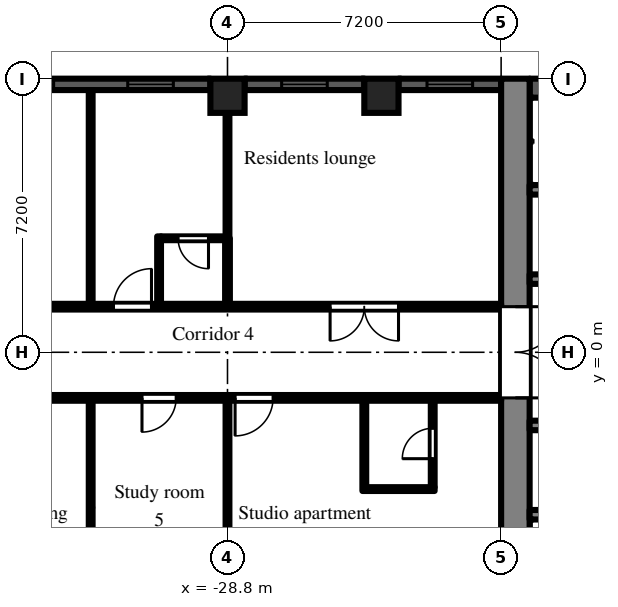
"""IFC4 building model, lengths in metres.
Left out: names, types, materials, properties, quantities, classifications, styles, units other than length and angle.
Written with IfcOpenShell. Run it as: python <this file> out.ifc"""

import sys

from ifc_helpers import new_model, si_unit, direction, frame, frame_2d, origin, origin_2d, place, context, subcontext, project, spatial, rectangle, extrude, element, fill, save


model = new_model("IFC4")
c1 = context("Model", 3, precision=1e-05, world=origin(), true_north=direction((0.0, 1.0)))
c2 = subcontext(c1, "Body", "Model", "MODEL_VIEW")
j1 = project(units=[si_unit("LENGTHUNIT", "METRE"), si_unit("PLANEANGLEUNIT", "RADIAN")], contexts=[c1])
p1 = place(None, origin())
s1 = spatial("IfcSite", under=j1, at=p1, CompositionType="ELEMENT")
p2 = place(p1, origin())
s2 = spatial("IfcBuilding", under=s1, at=p2, CompositionType="ELEMENT")
p3 = place(p2, frame((0.0, 0.0, 93.9)))
s3 = spatial("IfcBuildingStorey", under=s2, at=p3, CompositionType="ELEMENT", Elevation=93.9)
for number, where, z_axis, x_axis in (
    (1, (-28.8, 6.75, 0.0), (0.0, 0.0, 1.0), (1.0, 0.0, 0.0)),
    (2, (-24.75, 6.75, 0.0), (0.0, 0.0, 1.0), (1.0, 0.0, 0.0)),
):
    element("IfcColumn", number, at=place(p3, frame(where, z_axis=z_axis, x_axis=x_axis)), inside=s3, PredefinedType="COLUMN", context=c2, shape_type="SweptSolid", body=[
        extrude(rectangle(XDim=0.9, YDim=0.9, at=origin_2d()), origin(), (0.0, 0.0, 1.0), 3.0),
    ])
p4 = place(p3, frame((-21.6, 7.05, 0.0), z_axis=(0.0, 0.0, 1.0), x_axis=(-1.0, 0.0, 0.0)))
e3 = element("IfcWall", 3, at=p4, inside=s3, PredefinedType="SOLIDWALL", context=c2, shape_type="SweptSolid", body=[
    extrude(rectangle(XDim=2.7, YDim=0.3, at=frame_2d((1.35, 0.0))), origin(), (0.0, 0.0, 1.0), 2.1),
])
p5 = place(p4, frame((0.75, 0.0, 0.2)))
e4 = element("IfcOpeningElement", 4, at=p5, cuts=e3, PredefinedType="OPENING", context=c2, shape_type="SweptSolid", body=[
    extrude(rectangle(XDim=1.2, YDim=1.85, at=frame_2d((0.6, 0.925))), frame((0.0, 0.16, 0.0), z_axis=(0.0, -1.0, 0.0), x_axis=(1.0, 0.0, 0.0)), (0.0, 0.0, 1.0), 0.32),
])
p6 = place(p3, frame((-25.2, 7.05, 0.0), z_axis=(0.0, 0.0, 1.0), x_axis=(-1.0, 0.0, 0.0)))
e5 = element("IfcWall", 5, at=p6, inside=s3, PredefinedType="SOLIDWALL", context=c2, shape_type="SweptSolid", body=[
    extrude(rectangle(XDim=3.15, YDim=0.3, at=frame_2d((1.575, 0.0))), origin(), (0.0, 0.0, 1.0), 2.1),
])
p7 = place(p6, frame((0.975, 0.0, 0.2)))
e6 = element("IfcOpeningElement", 6, at=p7, cuts=e5, PredefinedType="OPENING", context=c2, shape_type="SweptSolid", body=[
    extrude(rectangle(XDim=1.2, YDim=1.85, at=frame_2d((0.6, 0.925))), frame((0.0, 0.16, 0.0), z_axis=(0.0, -1.0, 0.0), x_axis=(1.0, 0.0, 0.0)), (0.0, 0.0, 1.0), 0.32),
])
p8 = place(p3, frame((-29.25, 7.05, 0.0), z_axis=(0.0, 0.0, 1.0), x_axis=(-1.0, 0.0, 0.0)))
e7 = element("IfcWall", 7, at=p8, inside=s3, PredefinedType="SOLIDWALL", context=c2, shape_type="SweptSolid", body=[
    extrude(rectangle(XDim=6.3, YDim=0.3, at=frame_2d((3.15, 0.0))), origin(), (0.0, 0.0, 1.0), 2.1),
])
p9 = place(p8, frame((0.975, 0.0, 0.2)))
e8 = element("IfcOpeningElement", 8, at=p9, cuts=e7, PredefinedType="OPENING", context=c2, shape_type="SweptSolid", body=[
    extrude(rectangle(XDim=1.2, YDim=1.85, at=frame_2d((0.6, 0.925))), frame((0.0, 0.16, 0.0), z_axis=(0.0, -1.0, 0.0), x_axis=(1.0, 0.0, 0.0)), (0.0, 0.0, 1.0), 0.32),
])
p10 = place(p8, frame((4.125, 0.0, 0.2)))
e9 = element("IfcOpeningElement", 9, at=p10, cuts=e7, PredefinedType="OPENING", context=c2, shape_type="SweptSolid", body=[
    extrude(rectangle(XDim=1.2, YDim=1.85, at=frame_2d((0.6, 0.925))), frame((0.0, 0.16, 0.0), z_axis=(0.0, -1.0, 0.0), x_axis=(1.0, 0.0, 0.0)), (0.0, 0.0, 1.0), 0.32),
])
p11 = place(p3, frame((-21.225, -7.2, 0.0), z_axis=(0.0, 0.0, 1.0), x_axis=(0.0, 1.0, 0.0)))
e10 = element("IfcWall", 10, at=p11, inside=s3, PredefinedType="SHEAR", context=c2, shape_type="SweptSolid", body=[
    extrude(rectangle(XDim=14.4, YDim=0.75, at=frame_2d((7.2, 0.0))), origin(), (0.0, 0.0, 1.0), 2.575),
])
p12 = place(p11, frame((6.0, 0.0, 0.0)))
e11 = element("IfcOpeningElement", 11, at=p12, cuts=e10, PredefinedType="OPENING", context=c2, shape_type="SweptSolid", body=[
    extrude(rectangle(XDim=2.4, YDim=2.2, at=frame_2d((1.2, 1.1))), frame((0.0, 0.385, 0.0), z_axis=(0.0, -1.0, 0.0), x_axis=(1.0, 0.0, 0.0)), (0.0, 0.0, 1.0), 0.77),
])
p13 = place(p3, frame((-7.9, 6.95, 0.0), z_axis=(0.0, 0.0, 1.0), x_axis=(-1.0, 0.0, 0.0)))
e12 = element("IfcWall", 12, at=p13, inside=s3, PredefinedType="SHEAR", context=c2, shape_type="SweptSolid", body=[
    extrude(rectangle(XDim=12.95, YDim=0.5, at=frame_2d((6.475, 0.0))), origin(), (0.0, 0.0, 1.0), 2.575),
])
p14 = place(p3, frame((-7.9, 1.925, 0.0), z_axis=(0.0, 0.0, 1.0), x_axis=(-1.0, 0.0, 0.0)))
e13 = element("IfcWall", 13, at=p14, inside=s3, PredefinedType="SHEAR", context=c2, shape_type="SweptSolid", body=[
    extrude(rectangle(XDim=12.95, YDim=0.25, at=frame_2d((6.475, 0.0))), origin(), (0.0, 0.0, 1.0), 2.575),
])
p15 = place(p14, frame((0.525, 0.0, 0.0)))
e14 = element("IfcOpeningElement", 14, at=p15, cuts=e13, PredefinedType="OPENING", context=c2, shape_type="SweptSolid", body=[
    extrude(rectangle(XDim=0.9, YDim=2.1, at=frame_2d((0.45, 1.05))), frame((0.0, 0.135, 0.0), z_axis=(0.0, -1.0, 0.0), x_axis=(1.0, 0.0, 0.0)), (0.0, 0.0, 1.0), 0.27),
])
p16 = place(p14, frame((2.625, 0.0, 0.0)))
e15 = element("IfcOpeningElement", 15, at=p16, cuts=e13, PredefinedType="OPENING", context=c2, shape_type="SweptSolid", body=[
    extrude(rectangle(XDim=1.1, YDim=2.1, at=frame_2d((0.55, 1.05))), frame((0.0, 0.135, 0.0), z_axis=(0.0, -1.0, 0.0), x_axis=(1.0, 0.0, 0.0)), (0.0, 0.0, 1.0), 0.27),
])
p17 = place(p14, frame((7.125, 0.0, 0.0)))
e16 = element("IfcOpeningElement", 16, at=p17, cuts=e13, PredefinedType="OPENING", context=c2, shape_type="SweptSolid", body=[
    extrude(rectangle(XDim=0.9, YDim=2.1, at=frame_2d((0.45, 1.05))), frame((0.0, 0.135, 0.0), z_axis=(0.0, -1.0, 0.0), x_axis=(1.0, 0.0, 0.0)), (0.0, 0.0, 1.0), 0.27),
])
p18 = place(p3, frame((-12.3, 4.275, 0.0), z_axis=(0.0, 0.0, 1.0), x_axis=(-1.0, 0.0, 0.0)))
e17 = element("IfcWall", 17, at=p18, inside=s3, PredefinedType="SHEAR", context=c2, shape_type="SweptSolid", body=[
    extrude(rectangle(XDim=8.55, YDim=0.25, at=frame_2d((4.275, 0.0))), origin(), (0.0, 0.0, 1.0), 2.575),
])
p19 = place(p3, frame((-7.9, -1.925, 0.0), z_axis=(0.0, 0.0, 1.0), x_axis=(-1.0, 0.0, 0.0)))
e18 = element("IfcWall", 18, at=p19, inside=s3, PredefinedType="SHEAR", context=c2, shape_type="SweptSolid", body=[
    extrude(rectangle(XDim=12.95, YDim=0.25, at=frame_2d((6.475, 0.0))), origin(), (0.0, 0.0, 1.0), 2.575),
])
p20 = place(p19, frame((4.825, 0.0, 0.0)))
e19 = element("IfcOpeningElement", 19, at=p20, cuts=e18, PredefinedType="OPENING", context=c2, shape_type="SweptSolid", body=[
    extrude(rectangle(XDim=1.1, YDim=2.1, at=frame_2d((0.55, 1.05))), frame((0.0, 0.135, 0.0), z_axis=(0.0, -1.0, 0.0), x_axis=(1.0, 0.0, 0.0)), (0.0, 0.0, 1.0), 0.27),
])
p21 = place(p19, frame((7.025, 0.0, 0.0)))
e20 = element("IfcOpeningElement", 20, at=p21, cuts=e18, PredefinedType="OPENING", context=c2, shape_type="SweptSolid", body=[
    extrude(rectangle(XDim=1.1, YDim=2.1, at=frame_2d((0.55, 1.05))), frame((0.0, 0.135, 0.0), z_axis=(0.0, -1.0, 0.0), x_axis=(1.0, 0.0, 0.0)), (0.0, 0.0, 1.0), 0.27),
])
p22 = place(p19, frame((9.225, 0.0, 0.0)))
e21 = element("IfcOpeningElement", 21, at=p22, cuts=e18, PredefinedType="OPENING", context=c2, shape_type="SweptSolid", body=[
    extrude(rectangle(XDim=1.1, YDim=2.1, at=frame_2d((0.55, 1.05))), frame((0.0, 0.135, 0.0), z_axis=(0.0, -1.0, 0.0), x_axis=(1.0, 0.0, 0.0)), (0.0, 0.0, 1.0), 0.27),
])
p23 = place(p19, frame((0.525, 0.0, 0.0)))
e22 = element("IfcOpeningElement", 22, at=p23, cuts=e18, PredefinedType="OPENING", context=c2, shape_type="SweptSolid", body=[
    extrude(rectangle(XDim=0.9, YDim=2.1, at=frame_2d((0.45, 1.05))), frame((0.0, 0.135, 0.0), z_axis=(0.0, -1.0, 0.0), x_axis=(1.0, 0.0, 0.0)), (0.0, 0.0, 1.0), 0.27),
])
p24 = place(p19, frame((2.625, 0.0, 0.0)))
e23 = element("IfcOpeningElement", 23, at=p24, cuts=e18, PredefinedType="OPENING", context=c2, shape_type="SweptSolid", body=[
    extrude(rectangle(XDim=1.1, YDim=2.1, at=frame_2d((0.55, 1.05))), frame((0.0, 0.135, 0.0), z_axis=(0.0, -1.0, 0.0), x_axis=(1.0, 0.0, 0.0)), (0.0, 0.0, 1.0), 0.27),
])
p25 = place(p3, frame((-12.3, -4.275, 0.0), z_axis=(0.0, 0.0, 1.0), x_axis=(-1.0, 0.0, 0.0)))
e24 = element("IfcWall", 24, at=p25, inside=s3, PredefinedType="SHEAR", context=c2, shape_type="SweptSolid", body=[
    extrude(rectangle(XDim=8.55, YDim=0.25, at=frame_2d((4.275, 0.0))), origin(), (0.0, 0.0, 1.0), 2.575),
])
p26 = place(p3, frame((-36.5, -1.2, 0.0), z_axis=(0.0, 0.0, 1.0), x_axis=(1.0, 0.0, 0.0)))
e25 = element("IfcWall", 25, at=p26, inside=s3, PredefinedType="PARTITIONING", context=c2, shape_type="SweptSolid", body=[
    extrude(rectangle(XDim=14.9, YDim=0.15, at=frame_2d((7.45, 0.0))), origin(), (0.0, 0.0, 1.0), 2.575),
])
p27 = place(p26, frame((7.9, 0.0, 0.0)))
e26 = element("IfcOpeningElement", 26, at=p27, cuts=e25, PredefinedType="OPENING", context=c2, shape_type="SweptSolid", body=[
    extrude(rectangle(XDim=1.0, YDim=2.1, at=frame_2d((0.5, 1.05))), frame((0.0, 0.085, 0.0), z_axis=(0.0, -1.0, 0.0), x_axis=(1.0, 0.0, 0.0)), (0.0, 0.0, 1.0), 0.17),
])
p28 = place(p26, frame((5.45, 0.0, 0.0)))
e27 = element("IfcOpeningElement", 27, at=p28, cuts=e25, PredefinedType="OPENING", context=c2, shape_type="SweptSolid", body=[
    extrude(rectangle(XDim=0.9, YDim=2.1, at=frame_2d((0.45, 1.05))), frame((0.0, 0.085, 0.0), z_axis=(0.0, -1.0, 0.0), x_axis=(1.0, 0.0, 0.0)), (0.0, 0.0, 1.0), 0.17),
])
p29 = place(p26, frame((1.15, 0.0, 0.0)))
e28 = element("IfcOpeningElement", 28, at=p29, cuts=e25, PredefinedType="OPENING", context=c2, shape_type="SweptSolid", body=[
    extrude(rectangle(XDim=1.8, YDim=2.1, at=frame_2d((0.9, 1.05))), frame((0.0, 0.085, 0.0), z_axis=(0.0, -1.0, 0.0), x_axis=(1.0, 0.0, 0.0)), (0.0, 0.0, 1.0), 0.17),
])
p30 = place(p3, frame((-36.5, 1.2, 0.0), z_axis=(0.0, 0.0, 1.0), x_axis=(1.0, 0.0, 0.0)))
e29 = element("IfcWall", 29, at=p30, inside=s3, PredefinedType="PARTITIONING", context=c2, shape_type="SweptSolid", body=[
    extrude(rectangle(XDim=14.9, YDim=0.15, at=frame_2d((7.45, 0.0))), origin(), (0.0, 0.0, 1.0), 2.575),
])
p31 = place(p30, frame((10.4, 0.0, 0.0)))
e30 = element("IfcOpeningElement", 30, at=p31, cuts=e29, PredefinedType="OPENING", context=c2, shape_type="SweptSolid", body=[
    extrude(rectangle(XDim=1.8, YDim=2.1, at=frame_2d((0.9, 1.05))), frame((0.0, 0.085, 0.0), z_axis=(0.0, -1.0, 0.0), x_axis=(1.0, 0.0, 0.0)), (0.0, 0.0, 1.0), 0.17),
])
p32 = place(p30, frame((4.7, 0.0, 0.0)))
e31 = element("IfcOpeningElement", 31, at=p32, cuts=e29, PredefinedType="OPENING", context=c2, shape_type="SweptSolid", body=[
    extrude(rectangle(XDim=1.0, YDim=2.1, at=frame_2d((0.5, 1.05))), frame((0.0, 0.085, 0.0), z_axis=(0.0, -1.0, 0.0), x_axis=(1.0, 0.0, 0.0)), (0.0, 0.0, 1.0), 0.17),
])
p33 = place(p30, frame((1.15, 0.0, 0.0)))
e32 = element("IfcOpeningElement", 32, at=p33, cuts=e29, PredefinedType="OPENING", context=c2, shape_type="SweptSolid", body=[
    extrude(rectangle(XDim=1.8, YDim=2.1, at=frame_2d((0.9, 1.05))), frame((0.0, 0.085, 0.0), z_axis=(0.0, -1.0, 0.0), x_axis=(1.0, 0.0, 0.0)), (0.0, 0.0, 1.0), 0.17),
])
for number, where, z_axis, x_axis in (
    (33, (-32.4, -6.9, 0.0), (0.0, 0.0, 1.0), (0.0, 1.0, 0.0)),
    (34, (-32.4, 1.275, 0.0), (0.0, 0.0, 1.0), (0.0, 1.0, 0.0)),
):
    element("IfcWall", number, at=place(p3, frame(where, z_axis=z_axis, x_axis=x_axis)), inside=s3, PredefinedType="PARTITIONING", context=c2, shape_type="SweptSolid", body=[
        extrude(rectangle(XDim=5.625, YDim=0.1, at=frame_2d((2.812, 0.0))), origin(), (0.0, 0.0, 1.0), 2.575),
    ])
p34 = place(p3, frame((-30.6, 1.275, 0.0), z_axis=(0.0, 0.0, 1.0), x_axis=(0.0, 1.0, 0.0)))
e35 = element("IfcWall", 35, at=p34, inside=s3, PredefinedType="PARTITIONING", context=c2, shape_type="SweptSolid", body=[
    extrude(rectangle(XDim=1.775, YDim=0.1, at=frame_2d((0.888, 0.0))), origin(), (0.0, 0.0, 1.0), 2.575),
])
p35 = place(p3, frame((-30.55, 3.0, 0.0), z_axis=(0.0, 0.0, 1.0), x_axis=(1.0, 0.0, 0.0)))
e36 = element("IfcWall", 36, at=p35, inside=s3, PredefinedType="PARTITIONING", context=c2, shape_type="SweptSolid", body=[
    extrude(rectangle(XDim=1.688, YDim=0.1, at=frame_2d((0.844, 0.0))), origin(), (0.0, 0.0, 1.0), 2.575),
])
p36 = place(p35, frame((0.45, 0.0, 0.0)))
e37 = element("IfcOpeningElement", 37, at=p36, cuts=e36, PredefinedType="OPENING", context=c2, shape_type="SweptSolid", body=[
    extrude(rectangle(XDim=0.8, YDim=2.1, at=frame_2d((0.4, 1.05))), frame((0.0, 0.06, 0.0), z_axis=(0.0, -1.0, 0.0), x_axis=(1.0, 0.0, 0.0)), (0.0, 0.0, 1.0), 0.12),
])
p37 = place(p3, frame((-28.8, -6.9, 0.0), z_axis=(0.0, 0.0, 1.0), x_axis=(0.0, 1.0, 0.0)))
e38 = element("IfcWall", 38, at=p37, inside=s3, PredefinedType="PARTITIONING", context=c2, shape_type="SweptSolid", body=[
    extrude(rectangle(XDim=5.625, YDim=0.1, at=frame_2d((2.812, 0.0))), origin(), (0.0, 0.0, 1.0), 2.575),
])
p38 = place(p3, frame((-28.8, 1.275, 0.0), z_axis=(0.0, 0.0, 1.0), x_axis=(0.0, 1.0, 0.0)))
e39 = element("IfcWall", 39, at=p38, inside=s3, PredefinedType="PARTITIONING", context=c2, shape_type="SweptSolid", body=[
    extrude(rectangle(XDim=1.725, YDim=0.125, at=frame_2d((0.863, 0.0))), origin(), (0.0, 0.0, 1.0), 2.575),
])
p39 = place(p3, frame((-28.8, 3.0, 0.0), z_axis=(0.0, 0.0, 1.0), x_axis=(0.0, 1.0, 0.0)))
e40 = element("IfcWall", 40, at=p39, inside=s3, PredefinedType="PARTITIONING", context=c2, shape_type="SweptSolid", body=[
    extrude(rectangle(XDim=3.9, YDim=0.1, at=frame_2d((1.95, 0.0))), origin(), (0.0, 0.0, 1.0), 2.575),
])
p40 = place(p3, frame((-25.2, -3.65, 0.0), z_axis=(0.0, 0.0, 1.0), x_axis=(0.0, 1.0, 0.0)))
e41 = element("IfcWall", 41, at=p40, inside=s3, PredefinedType="PARTITIONING", context=c2, shape_type="SweptSolid", body=[
    extrude(rectangle(XDim=2.375, YDim=0.1, at=frame_2d((1.188, 0.0))), origin(), (0.0, 0.0, 1.0), 2.575),
])
p41 = place(p3, frame((-25.15, -3.6, 0.0), z_axis=(0.0, 0.0, 1.0), x_axis=(1.0, 0.0, 0.0)))
e42 = element("IfcWall", 42, at=p41, inside=s3, PredefinedType="PARTITIONING", context=c2, shape_type="SweptSolid", body=[
    extrude(rectangle(XDim=1.8, YDim=0.1, at=frame_2d((0.9, 0.0))), origin(), (0.0, 0.0, 1.0), 2.575),
])
p42 = place(p3, frame((-23.4, -3.55, 0.0), z_axis=(0.0, 0.0, 1.0), x_axis=(0.0, 1.0, 0.0)))
e43 = element("IfcWall", 43, at=p42, inside=s3, PredefinedType="PARTITIONING", context=c2, shape_type="SweptSolid", body=[
    extrude(rectangle(XDim=2.275, YDim=0.1, at=frame_2d((1.138, 0.0))), origin(), (0.0, 0.0, 1.0), 2.575),
])
p43 = place(p42, frame((0.75, 0.0, 0.0)))
e44 = element("IfcOpeningElement", 44, at=p43, cuts=e43, PredefinedType="OPENING", context=c2, shape_type="SweptSolid", body=[
    extrude(rectangle(XDim=0.8, YDim=2.1, at=frame_2d((0.4, 1.05))), frame((0.0, 0.06, 0.0), z_axis=(0.0, -1.0, 0.0), x_axis=(1.0, 0.0, 0.0)), (0.0, 0.0, 1.0), 0.12),
])
p44 = place(p5, origin())
e45 = element("IfcWindow", 45, at=p44, inside=s3, PartitioningType="SINGLE_PANEL", PredefinedType="WINDOW", context=c2, shape_type="SweptSolid", body=[
    extrude(rectangle(XDim=1.2, YDim=1.85, at=frame_2d((0.6, 0.925))), frame((0.0, 0.03, 0.0), z_axis=(0.0, -1.0, 0.0), x_axis=(1.0, 0.0, 0.0)), (0.0, 0.0, 1.0), 0.06),
])
fill(e4, e45)
p45 = place(p7, origin())
e46 = element("IfcWindow", 46, at=p45, inside=s3, PartitioningType="SINGLE_PANEL", PredefinedType="WINDOW", context=c2, shape_type="SweptSolid", body=[
    extrude(rectangle(XDim=1.2, YDim=1.85, at=frame_2d((0.6, 0.925))), frame((0.0, 0.03, 0.0), z_axis=(0.0, -1.0, 0.0), x_axis=(1.0, 0.0, 0.0)), (0.0, 0.0, 1.0), 0.06),
])
fill(e6, e46)
p46 = place(p9, origin())
e47 = element("IfcWindow", 47, at=p46, inside=s3, PartitioningType="SINGLE_PANEL", PredefinedType="WINDOW", context=c2, shape_type="SweptSolid", body=[
    extrude(rectangle(XDim=1.2, YDim=1.85, at=frame_2d((0.6, 0.925))), frame((0.0, 0.03, 0.0), z_axis=(0.0, -1.0, 0.0), x_axis=(1.0, 0.0, 0.0)), (0.0, 0.0, 1.0), 0.06),
])
fill(e8, e47)
p47 = place(p10, origin())
e48 = element("IfcWindow", 48, at=p47, inside=s3, PartitioningType="SINGLE_PANEL", PredefinedType="WINDOW", context=c2, shape_type="SweptSolid", body=[
    extrude(rectangle(XDim=1.2, YDim=1.85, at=frame_2d((0.6, 0.925))), frame((0.0, 0.03, 0.0), z_axis=(0.0, -1.0, 0.0), x_axis=(1.0, 0.0, 0.0)), (0.0, 0.0, 1.0), 0.06),
])
fill(e9, e48)
p48 = place(p12, frame((2.4, 0.0, 0.0), z_axis=(0.0, 0.0, 1.0), x_axis=(-1.0, 0.0, 0.0)))
e49 = element("IfcDoor", 49, at=p48, inside=s3, OperationType="DOUBLE_DOOR_DOUBLE_SWING", PredefinedType="DOOR", context=c2, shape_type="SweptSolid", body=[
    extrude(rectangle(XDim=2.4, YDim=2.2, at=frame_2d((1.2, 1.1))), frame((0.0, 0.025, 0.0), z_axis=(0.0, -1.0, 0.0), x_axis=(1.0, 0.0, 0.0)), (0.0, 0.0, 1.0), 0.05),
])
fill(e11, e49)
p49 = place(p43, origin())
e50 = element("IfcDoor", 50, at=p49, inside=s3, OperationType="SINGLE_SWING_LEFT", PredefinedType="DOOR", context=c2, shape_type="SweptSolid", body=[
    extrude(rectangle(XDim=0.8, YDim=2.1, at=frame_2d((0.4, 1.05))), frame((0.0, 0.025, 0.0), z_axis=(0.0, -1.0, 0.0), x_axis=(1.0, 0.0, 0.0)), (0.0, 0.0, 1.0), 0.05),
])
fill(e44, e50)
p50 = place(p27, frame((1.0, 0.0, 0.0), z_axis=(0.0, 0.0, 1.0), x_axis=(-1.0, 0.0, 0.0)))
e51 = element("IfcDoor", 51, at=p50, inside=s3, OperationType="SINGLE_SWING_RIGHT", PredefinedType="DOOR", context=c2, shape_type="SweptSolid", body=[
    extrude(rectangle(XDim=1.0, YDim=2.1, at=frame_2d((0.5, 1.05))), frame((0.0, 0.025, 0.0), z_axis=(0.0, -1.0, 0.0), x_axis=(1.0, 0.0, 0.0)), (0.0, 0.0, 1.0), 0.05),
])
fill(e26, e51)
p51 = place(p28, frame((0.9, 0.0, 0.0), z_axis=(0.0, 0.0, 1.0), x_axis=(-1.0, 0.0, 0.0)))
e52 = element("IfcDoor", 52, at=p51, inside=s3, OperationType="SINGLE_SWING_RIGHT", PredefinedType="DOOR", context=c2, shape_type="SweptSolid", body=[
    extrude(rectangle(XDim=0.9, YDim=2.1, at=frame_2d((0.45, 1.05))), frame((0.0, 0.025, 0.0), z_axis=(0.0, -1.0, 0.0), x_axis=(1.0, 0.0, 0.0)), (0.0, 0.0, 1.0), 0.05),
])
fill(e27, e52)
p52 = place(p31, frame((1.8, 0.0, 0.0), z_axis=(0.0, 0.0, 1.0), x_axis=(-1.0, 0.0, 0.0)))
e53 = element("IfcDoor", 53, at=p52, inside=s3, OperationType="DOUBLE_DOOR_DOUBLE_SWING", PredefinedType="DOOR", context=c2, shape_type="SweptSolid", body=[
    extrude(rectangle(XDim=1.8, YDim=2.1, at=frame_2d((0.9, 1.05))), frame((0.0, 0.025, 0.0), z_axis=(0.0, -1.0, 0.0), x_axis=(1.0, 0.0, 0.0)), (0.0, 0.0, 1.0), 0.05),
])
fill(e30, e53)
p53 = place(p36, frame((0.8, 0.0, 0.0), z_axis=(0.0, 0.0, 1.0), x_axis=(-1.0, 0.0, 0.0)))
e54 = element("IfcDoor", 54, at=p53, inside=s3, OperationType="SINGLE_SWING_LEFT", PredefinedType="DOOR", context=c2, shape_type="SweptSolid", body=[
    extrude(rectangle(XDim=0.8, YDim=2.1, at=frame_2d((0.4, 1.05))), frame((0.0, 0.025, 0.0), z_axis=(0.0, -1.0, 0.0), x_axis=(1.0, 0.0, 0.0)), (0.0, 0.0, 1.0), 0.05),
])
fill(e37, e54)
p54 = place(p32, origin())
e55 = element("IfcDoor", 55, at=p54, inside=s3, OperationType="SINGLE_SWING_RIGHT", PredefinedType="DOOR", context=c2, shape_type="SweptSolid", body=[
    extrude(rectangle(XDim=1.0, YDim=2.1, at=frame_2d((0.5, 1.05))), frame((0.0, 0.025, 0.0), z_axis=(0.0, -1.0, 0.0), x_axis=(1.0, 0.0, 0.0)), (0.0, 0.0, 1.0), 0.05),
])
fill(e31, e55)
save(model, sys.argv[1])
